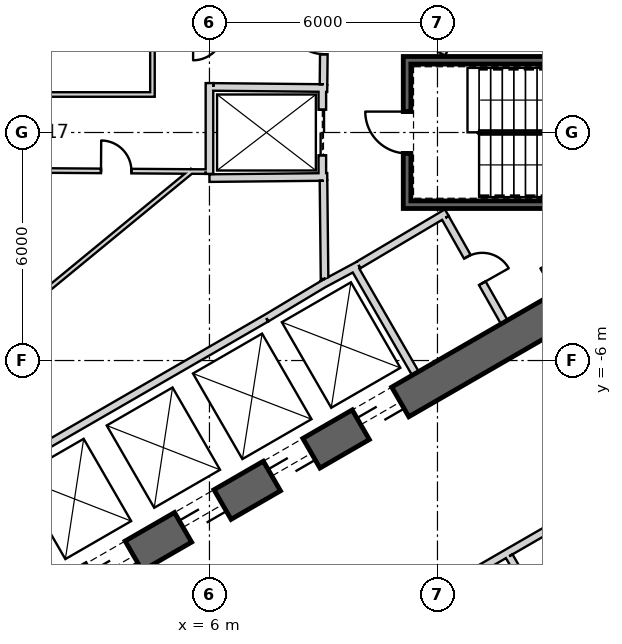
"""IFC4 building model, lengths in metres.
Left out: names, types, materials, properties, quantities, classifications, styles, units other than length and angle.
Written with IfcOpenShell. Run it as: python <this file> out.ifc"""

import sys

from ifc_helpers import new_model, si_unit, direction, frame, frame_2d, origin, place, context, subcontext, project, spatial, rectangle, extrude, element, fill, save


model = new_model("IFC4")
c1 = context("Model", 3, precision=1e-05, world=origin(), true_north=direction((0.0, 1.0)))
c2 = subcontext(c1, "Body", "Model", "MODEL_VIEW")
j1 = project(units=[si_unit("LENGTHUNIT", "METRE"), si_unit("PLANEANGLEUNIT", "RADIAN")], contexts=[c1])
p1 = place(None, origin())
s1 = spatial("IfcSite", under=j1, at=p1, CompositionType="ELEMENT")
p2 = place(p1, origin())
s2 = spatial("IfcBuilding", under=s1, at=p2, CompositionType="ELEMENT")
p3 = place(p2, frame((0.0, 0.0, 131.6)))
s3 = spatial("IfcBuildingStorey", under=s2, at=p3, CompositionType="ELEMENT", Elevation=131.6)
p4 = place(p3, frame((19.475, 2.208, 0.0), z_axis=(0.0, 0.0, 1.0), x_axis=(-0.866028369851, 0.499994862586, 0.0)))
e1 = element("IfcWall", 1, at=p4, inside=s3, PredefinedType="SHEAR", context=c2, shape_type="SweptSolid", body=[
    extrude(rectangle(XDim=31.523, YDim=0.9, at=frame_2d((15.762, 0.0))), origin(), (0.0, 0.0, 1.0), 4.1),
])
p5 = place(p4, frame((7.062, 0.0, 0.0)))
e2 = element("IfcOpeningElement", 2, at=p5, cuts=e1, PredefinedType="OPENING", context=c2, shape_type="SweptSolid", body=[
    extrude(rectangle(XDim=1.2, YDim=2.4, at=frame_2d((0.6, 1.2))), frame((0.0, 0.46, 0.0), z_axis=(0.0, -1.0, 0.0), x_axis=(1.0, 0.0, 0.0)), (0.0, 0.0, 1.0), 0.92),
])
p6 = place(p4, frame((9.762, 0.0, 0.0)))
e3 = element("IfcOpeningElement", 3, at=p6, cuts=e1, PredefinedType="OPENING", context=c2, shape_type="SweptSolid", body=[
    extrude(rectangle(XDim=1.2, YDim=2.4, at=frame_2d((0.6, 1.2))), frame((0.0, 0.46, 0.0), z_axis=(0.0, -1.0, 0.0), x_axis=(1.0, 0.0, 0.0)), (0.0, 0.0, 1.0), 0.92),
])
p7 = place(p4, frame((12.462, 0.0, 0.0)))
e4 = element("IfcOpeningElement", 4, at=p7, cuts=e1, PredefinedType="OPENING", context=c2, shape_type="SweptSolid", body=[
    extrude(rectangle(XDim=1.2, YDim=2.4, at=frame_2d((0.6, 1.2))), frame((0.0, 0.46, 0.0), z_axis=(0.0, -1.0, 0.0), x_axis=(1.0, 0.0, 0.0)), (0.0, 0.0, 1.0), 0.92),
])
p8 = place(p4, frame((15.162, 0.0, 0.0)))
e5 = element("IfcOpeningElement", 5, at=p8, cuts=e1, PredefinedType="OPENING", context=c2, shape_type="SweptSolid", body=[
    extrude(rectangle(XDim=1.2, YDim=2.4, at=frame_2d((0.6, 1.2))), frame((0.0, 0.46, 0.0), z_axis=(0.0, -1.0, 0.0), x_axis=(1.0, 0.0, 0.0)), (0.0, 0.0, 1.0), 0.92),
])
p9 = place(p4, frame((17.862, 0.0, 0.0)))
e6 = element("IfcOpeningElement", 6, at=p9, cuts=e1, PredefinedType="OPENING", context=c2, shape_type="SweptSolid", body=[
    extrude(rectangle(XDim=1.2, YDim=2.4, at=frame_2d((0.6, 1.2))), frame((0.0, 0.46, 0.0), z_axis=(0.0, -1.0, 0.0), x_axis=(1.0, 0.0, 0.0)), (0.0, 0.0, 1.0), 0.92),
])
p10 = place(p4, frame((20.562, 0.0, 0.0)))
e7 = element("IfcOpeningElement", 7, at=p10, cuts=e1, PredefinedType="OPENING", context=c2, shape_type="SweptSolid", body=[
    extrude(rectangle(XDim=1.2, YDim=2.4, at=frame_2d((0.6, 1.2))), frame((0.0, 0.46, 0.0), z_axis=(0.0, -1.0, 0.0), x_axis=(1.0, 0.0, 0.0)), (0.0, 0.0, 1.0), 0.92),
])
p11 = place(p4, frame((23.262, 0.0, 0.0)))
e8 = element("IfcOpeningElement", 8, at=p11, cuts=e1, PredefinedType="OPENING", context=c2, shape_type="SweptSolid", body=[
    extrude(rectangle(XDim=1.2, YDim=2.4, at=frame_2d((0.6, 1.2))), frame((0.0, 0.46, 0.0), z_axis=(0.0, -1.0, 0.0), x_axis=(1.0, 0.0, 0.0)), (0.0, 0.0, 1.0), 0.92),
])
p12 = place(p4, frame((3.612, 0.0, 0.0)))
e9 = element("IfcOpeningElement", 9, at=p12, cuts=e1, PredefinedType="OPENING", context=c2, shape_type="SweptSolid", body=[
    extrude(rectangle(XDim=1.2, YDim=2.4, at=frame_2d((0.6, 1.2))), frame((0.0, 0.46, 0.0), z_axis=(0.0, -1.0, 0.0), x_axis=(1.0, 0.0, 0.0)), (0.0, 0.0, 1.0), 0.92),
])
p13 = place(p4, frame((26.712, 0.0, 0.0)))
e10 = element("IfcOpeningElement", 10, at=p13, cuts=e1, PredefinedType="OPENING", context=c2, shape_type="SweptSolid", body=[
    extrude(rectangle(XDim=1.2, YDim=2.4, at=frame_2d((0.6, 1.2))), frame((0.0, 0.46, 0.0), z_axis=(0.0, -1.0, 0.0), x_axis=(1.0, 0.0, 0.0)), (0.0, 0.0, 1.0), 0.92),
])
p14 = place(p3, frame((-7.825, -17.97, 0.0), z_axis=(0.0, 0.0, 1.0), x_axis=(0.866028369851, 0.499994862586, 0.0)))
e11 = element("IfcWall", 11, at=p14, inside=s3, PredefinedType="SHEAR", context=c2, shape_type="SweptSolid", body=[
    extrude(rectangle(XDim=31.523, YDim=0.9, at=frame_2d((15.762, 0.0))), origin(), (0.0, 0.0, 1.0), 4.1),
])
p15 = place(p14, frame((7.062, 0.0, 0.0)))
e12 = element("IfcOpeningElement", 12, at=p15, cuts=e11, PredefinedType="OPENING", context=c2, shape_type="SweptSolid", body=[
    extrude(rectangle(XDim=1.2, YDim=2.4, at=frame_2d((0.6, 1.2))), frame((0.0, 0.46, 0.0), z_axis=(0.0, -1.0, 0.0), x_axis=(1.0, 0.0, 0.0)), (0.0, 0.0, 1.0), 0.92),
])
p16 = place(p14, frame((9.762, 0.0, 0.0)))
e13 = element("IfcOpeningElement", 13, at=p16, cuts=e11, PredefinedType="OPENING", context=c2, shape_type="SweptSolid", body=[
    extrude(rectangle(XDim=1.2, YDim=2.4, at=frame_2d((0.6, 1.2))), frame((0.0, 0.46, 0.0), z_axis=(0.0, -1.0, 0.0), x_axis=(1.0, 0.0, 0.0)), (0.0, 0.0, 1.0), 0.92),
])
p17 = place(p14, frame((12.462, 0.0, 0.0)))
e14 = element("IfcOpeningElement", 14, at=p17, cuts=e11, PredefinedType="OPENING", context=c2, shape_type="SweptSolid", body=[
    extrude(rectangle(XDim=1.2, YDim=2.4, at=frame_2d((0.6, 1.2))), frame((0.0, 0.46, 0.0), z_axis=(0.0, -1.0, 0.0), x_axis=(1.0, 0.0, 0.0)), (0.0, 0.0, 1.0), 0.92),
])
p18 = place(p14, frame((15.162, 0.0, 0.0)))
e15 = element("IfcOpeningElement", 15, at=p18, cuts=e11, PredefinedType="OPENING", context=c2, shape_type="SweptSolid", body=[
    extrude(rectangle(XDim=1.2, YDim=2.4, at=frame_2d((0.6, 1.2))), frame((0.0, 0.46, 0.0), z_axis=(0.0, -1.0, 0.0), x_axis=(1.0, 0.0, 0.0)), (0.0, 0.0, 1.0), 0.92),
])
p19 = place(p14, frame((17.862, 0.0, 0.0)))
e16 = element("IfcOpeningElement", 16, at=p19, cuts=e11, PredefinedType="OPENING", context=c2, shape_type="SweptSolid", body=[
    extrude(rectangle(XDim=1.2, YDim=2.4, at=frame_2d((0.6, 1.2))), frame((0.0, 0.46, 0.0), z_axis=(0.0, -1.0, 0.0), x_axis=(1.0, 0.0, 0.0)), (0.0, 0.0, 1.0), 0.92),
])
p20 = place(p14, frame((20.562, 0.0, 0.0)))
e17 = element("IfcOpeningElement", 17, at=p20, cuts=e11, PredefinedType="OPENING", context=c2, shape_type="SweptSolid", body=[
    extrude(rectangle(XDim=1.2, YDim=2.4, at=frame_2d((0.6, 1.2))), frame((0.0, 0.46, 0.0), z_axis=(0.0, -1.0, 0.0), x_axis=(1.0, 0.0, 0.0)), (0.0, 0.0, 1.0), 0.92),
])
p21 = place(p14, frame((26.712, 0.0, 0.0)))
e18 = element("IfcOpeningElement", 18, at=p21, cuts=e11, PredefinedType="OPENING", context=c2, shape_type="SweptSolid", body=[
    extrude(rectangle(XDim=1.2, YDim=2.4, at=frame_2d((0.6, 1.2))), frame((0.0, 0.46, 0.0), z_axis=(0.0, -1.0, 0.0), x_axis=(1.0, 0.0, 0.0)), (0.0, 0.0, 1.0), 0.92),
])
p22 = place(p14, frame((3.612, 0.0, 0.0)))
e19 = element("IfcOpeningElement", 19, at=p22, cuts=e11, PredefinedType="OPENING", context=c2, shape_type="SweptSolid", body=[
    extrude(rectangle(XDim=1.2, YDim=2.4, at=frame_2d((0.6, 1.2))), frame((0.0, 0.46, 0.0), z_axis=(0.0, -1.0, 0.0), x_axis=(1.0, 0.0, 0.0)), (0.0, 0.0, 1.0), 0.92),
])
p23 = place(p3, frame((12.11, 2.073, 0.0), z_axis=(0.0, 0.0, 1.0), x_axis=(0.49196600604, 0.870614408852, 0.0)))
e20 = element("IfcWall", 20, at=p23, inside=s3, PredefinedType="PLUMBINGWALL", context=c2, shape_type="SweptSolid", body=[
    extrude(rectangle(XDim=3.35, YDim=0.2, at=frame_2d((1.675, 0.0))), origin(), (0.0, 0.0, 1.0), 3.8),
])
p24 = place(p3, frame((0.483, -8.936, 0.0), z_axis=(0.0, 0.0, 1.0), x_axis=(0.866030989016, 0.499990325971, 0.0)))
e21 = element("IfcWall", 21, at=p24, inside=s3, PredefinedType="PLUMBINGWALL", context=c2, shape_type="SweptSolid", body=[
    extrude(rectangle(XDim=8.1, YDim=0.2, at=frame_2d((4.05, 0.0))), origin(), (0.0, 0.0, 1.0), 3.8),
])
p25 = place(p3, frame((9.795, -3.525, 0.0), z_axis=(0.0, 0.0, 1.0), x_axis=(0.499984717929, -0.866034226713, 0.0)))
e22 = element("IfcWall", 22, at=p25, inside=s3, PredefinedType="PLUMBINGWALL", context=c2, shape_type="SweptSolid", body=[
    extrude(rectangle(XDim=3.25, YDim=0.2, at=frame_2d((1.625, 0.0))), origin(), (0.0, 0.0, 1.0), 3.8),
])
p26 = place(p3, frame((8.974, -3.999, 0.0), z_axis=(0.0, 0.0, 1.0), x_axis=(0.880907015104, 0.473289373154, 0.0)))
e23 = element("IfcWall", 23, at=p26, inside=s3, PredefinedType="PLUMBINGWALL", context=c2, shape_type="SweptSolid", body=[
    extrude(rectangle(XDim=1.078, YDim=0.2, at=frame_2d((0.539, 0.0))), origin(), (0.0, 0.0, 1.0), 3.8),
])
p27 = place(p3, frame((7.497, -4.886, 0.0), z_axis=(0.0, 0.0, 1.0), x_axis=(0.857516281273, 0.51445682749, 0.0)))
e24 = element("IfcWall", 24, at=p27, inside=s3, PredefinedType="PLUMBINGWALL", context=c2, shape_type="SweptSolid", body=[
    extrude(rectangle(XDim=1.845, YDim=0.2, at=frame_2d((0.922, 0.0))), origin(), (0.0, 0.0, 1.0), 3.8),
])
p28 = place(p3, frame((19.2, 1.9, -0.3), z_axis=(0.0, 0.0, 1.0), x_axis=(-1.0, 0.0, 0.0)))
e25 = element("IfcWall", 25, at=p28, inside=s3, PredefinedType="SHEAR", context=c2, shape_type="SweptSolid", body=[
    extrude(rectangle(XDim=8.1, YDim=0.2, at=frame_2d((4.05, 0.0))), origin(), (0.0, 0.0, 1.0), 4.1),
])
p29 = place(p3, frame((11.1, -1.9, -0.3), z_axis=(0.0, 0.0, 1.0), x_axis=(1.0, 0.0, 0.0)))
e26 = element("IfcWall", 26, at=p29, inside=s3, PredefinedType="SHEAR", context=c2, shape_type="SweptSolid", body=[
    extrude(rectangle(XDim=7.9, YDim=0.2, at=frame_2d((3.95, 0.0))), origin(), (0.0, 0.0, 1.0), 4.1),
])
p30 = place(p3, frame((11.2, -1.8, -0.3), z_axis=(0.0, 0.0, 1.0), x_axis=(0.0, 1.0, 0.0)))
e27 = element("IfcWall", 27, at=p30, inside=s3, PredefinedType="SHEAR", context=c2, shape_type="SweptSolid", body=[
    extrude(rectangle(XDim=3.6, YDim=0.2, at=frame_2d((1.8, 0.0))), origin(), (0.0, 0.0, 1.0), 4.1),
])
p31 = place(p30, frame((1.25, 0.0, 0.3)))
e28 = element("IfcOpeningElement", 28, at=p31, cuts=e27, PredefinedType="OPENING", context=c2, shape_type="SweptSolid", body=[
    extrude(rectangle(XDim=1.1, YDim=2.1, at=frame_2d((0.55, 1.05))), frame((0.0, 0.11, 0.0), z_axis=(0.0, -1.0, 0.0), x_axis=(1.0, 0.0, 0.0)), (0.0, 0.0, 1.0), 0.22),
])
p32 = place(p3, frame((8.97, 1.2, 0.0), z_axis=(0.0, 0.0, 1.0), x_axis=(0.0, -1.0, 0.0)))
e29 = element("IfcWall", 29, at=p32, inside=s3, PredefinedType="PLUMBINGWALL", context=c2, shape_type="SweptSolid", body=[
    extrude(rectangle(XDim=2.4, YDim=0.2, at=frame_2d((1.2, 0.0))), origin(), (0.0, 0.0, 1.0), 3.8),
])
p33 = place(p32, frame((0.6, 0.0, 0.0)))
e30 = element("IfcOpeningElement", 30, at=p33, cuts=e29, PredefinedType="OPENING", context=c2, shape_type="SweptSolid", body=[
    extrude(rectangle(XDim=1.2, YDim=2.4, at=frame_2d((0.6, 1.2))), frame((0.0, 0.11, 0.0), z_axis=(0.0, -1.0, 0.0), x_axis=(1.0, 0.0, 0.0)), (0.0, 0.0, 1.0), 0.22),
])
p34 = place(p3, frame((9.1, -1.169, 0.0), z_axis=(0.0, 0.0, 1.0), x_axis=(-0.999949988, -0.010001074852, 0.0)))
e31 = element("IfcWall", 31, at=p34, inside=s3, PredefinedType="PLUMBINGWALL", context=c2, shape_type="SweptSolid", body=[
    extrude(rectangle(XDim=3.1, YDim=0.2, at=frame_2d((1.55, 0.0))), origin(), (0.0, 0.0, 1.0), 3.8),
])
p35 = place(p3, frame((6.0, -1.09, 0.0), z_axis=(0.0, 0.0, 1.0), x_axis=(0.0, 1.0, 0.0)))
e32 = element("IfcWall", 32, at=p35, inside=s3, PredefinedType="PLUMBINGWALL", context=c2, shape_type="SweptSolid", body=[
    extrude(rectangle(XDim=2.39, YDim=0.2, at=frame_2d((1.195, 0.0))), origin(), (0.0, 0.0, 1.0), 3.8),
])
p36 = place(p3, frame((9.1, 1.169, 0.0), z_axis=(0.0, 0.0, 1.0), x_axis=(-0.99994990606, 0.010009264196, 0.0)))
e33 = element("IfcWall", 33, at=p36, inside=s3, PredefinedType="PLUMBINGWALL", context=c2, shape_type="SweptSolid", body=[
    extrude(rectangle(XDim=3.0, YDim=0.2, at=frame_2d((1.5, 0.0))), origin(), (0.0, 0.0, 1.0), 3.8),
])
p37 = place(p3, frame((12.245, -2.109, 0.0), z_axis=(0.0, 0.0, 1.0), x_axis=(-0.860414880418, -0.509594185166, 0.0)))
e34 = element("IfcWall", 34, at=p37, inside=s3, PredefinedType="PARTITIONING", context=c2, shape_type="SweptSolid", body=[
    extrude(rectangle(XDim=2.7, YDim=0.2, at=frame_2d((1.35, 0.0))), origin(), (0.0, 0.0, 1.0), 3.8),
])
p38 = place(p3, frame((13.758, -4.99, 0.0), z_axis=(0.0, 0.0, 1.0), x_axis=(-0.491993409184, 0.87059892334, 0.0)))
e35 = element("IfcWall", 35, at=p38, inside=s3, PredefinedType="PARTITIONING", context=c2, shape_type="SweptSolid", body=[
    extrude(rectangle(XDim=3.15, YDim=0.2, at=frame_2d((1.575, 0.0))), origin(), (0.0, 0.0, 1.0), 3.8),
])
p39 = place(p38, frame((1.175, 0.0, 0.0)))
e36 = element("IfcOpeningElement", 36, at=p39, cuts=e35, PredefinedType="OPENING", context=c2, shape_type="SweptSolid", body=[
    extrude(rectangle(XDim=0.8, YDim=2.1, at=frame_2d((0.4, 1.05))), frame((0.0, 0.11, 0.0), z_axis=(0.0, -1.0, 0.0), x_axis=(1.0, 0.0, 0.0)), (0.0, 0.0, 1.0), 0.22),
])
p40 = place(p3, frame((9.029, -3.851, 0.0), z_axis=(0.0, 0.0, 1.0), x_axis=(-0.010784614026, 0.999941844359, 0.0)))
e37 = element("IfcWall", 37, at=p40, inside=s3, PredefinedType="PARTITIONING", context=c2, shape_type="SweptSolid", body=[
    extrude(rectangle(XDim=2.581, YDim=0.2, at=frame_2d((1.291, 0.0))), origin(), (0.0, 0.0, 1.0), 3.8),
])
p41 = place(p3, frame((9.001, 1.27, 0.0), z_axis=(0.0, 0.0, 1.0), x_axis=(0.010783593937, 0.99994185536, 0.0)))
e38 = element("IfcWall", 38, at=p41, inside=s3, PredefinedType="PARTITIONING", context=c2, shape_type="SweptSolid", body=[
    extrude(rectangle(XDim=2.581, YDim=0.2, at=frame_2d((1.291, 0.0))), origin(), (0.0, 0.0, 1.0), 3.8),
])
p42 = place(p41, frame((0.791, 0.0, 0.0)))
e39 = element("IfcOpeningElement", 39, at=p42, cuts=e38, PredefinedType="OPENING", context=c2, shape_type="SweptSolid", body=[
    extrude(rectangle(XDim=1.0, YDim=2.1, at=frame_2d((0.5, 1.05))), frame((0.0, 0.11, 0.0), z_axis=(0.0, -1.0, 0.0), x_axis=(1.0, 0.0, 0.0)), (0.0, 0.0, 1.0), 0.22),
])
p43 = place(p3, frame((5.548, -1.0, 0.0), z_axis=(0.0, 0.0, 1.0), x_axis=(-0.772345431507, -0.635202750648, 0.0)))
e40 = element("IfcWall", 40, at=p43, inside=s3, PredefinedType="PARTITIONING", context=c2, shape_type="SweptSolid", body=[
    extrude(rectangle(XDim=7.415, YDim=0.12, at=frame_2d((3.707, 0.0))), origin(), (0.0, 0.0, 1.0), 3.8),
])
p44 = place(p3, frame((5.9, -1.029, 0.0), z_axis=(0.0, 0.0, 1.0), x_axis=(-0.999977012451, 0.006780454946, 0.0)))
e41 = element("IfcWall", 41, at=p44, inside=s3, PredefinedType="PARTITIONING", context=c2, shape_type="SweptSolid", body=[
    extrude(rectangle(XDim=4.357, YDim=0.12, at=frame_2d((2.178, 0.0))), origin(), (0.0, 0.0, 1.0), 3.8),
])
p45 = place(p44, frame((1.954, 0.0, 0.0)))
e42 = element("IfcOpeningElement", 42, at=p45, cuts=e41, PredefinedType="OPENING", context=c2, shape_type="SweptSolid", body=[
    extrude(rectangle(XDim=0.8, YDim=2.1, at=frame_2d((0.4, 1.05))), frame((0.0, 0.07, 0.0), z_axis=(0.0, -1.0, 0.0), x_axis=(1.0, 0.0, 0.0)), (0.0, 0.0, 1.0), 0.14),
])
p46 = place(p3, frame((4.5, 0.94, 0.0), z_axis=(0.0, 0.0, 1.0), x_axis=(0.0, 1.0, 0.0)))
e43 = element("IfcWall", 43, at=p46, inside=s3, PredefinedType="PARTITIONING", context=c2, shape_type="SweptSolid", body=[
    extrude(rectangle(XDim=1.7, YDim=0.12, at=frame_2d((0.85, 0.0))), origin(), (0.0, 0.0, 1.0), 3.8),
])
p47 = place(p3, frame((1.542, 1.0, 0.0), z_axis=(0.0, 0.0, 1.0), x_axis=(1.0, 0.0, 0.0)))
e44 = element("IfcWall", 44, at=p47, inside=s3, PredefinedType="PARTITIONING", context=c2, shape_type="SweptSolid", body=[
    extrude(rectangle(XDim=2.898, YDim=0.12, at=frame_2d((1.449, 0.0))), origin(), (0.0, 0.0, 1.0), 3.8),
])
p48 = place(p3, frame((-0.523, -19.354, 0.0), z_axis=(0.0, 0.0, 1.0), x_axis=(0.866024925705, 0.500000828058, 0.0)))
e45 = element("IfcWall", 45, at=p48, inside=s3, PredefinedType="PARTITIONING", context=c2, shape_type="SweptSolid", body=[
    extrude(rectangle(XDim=26.647, YDim=0.2, at=frame_2d((13.323, 0.0))), origin(), (0.0, 0.0, 1.0), 2.98),
])
p49 = place(p48, frame((21.145, 0.0, 0.0)))
e46 = element("IfcOpeningElement", 46, at=p49, cuts=e45, PredefinedType="OPENING", context=c2, shape_type="SweptSolid", body=[
    extrude(rectangle(XDim=1.0, YDim=2.1, at=frame_2d((0.5, 1.05))), frame((0.0, 0.11, 0.0), z_axis=(0.0, -1.0, 0.0), x_axis=(1.0, 0.0, 0.0)), (0.0, 0.0, 1.0), 0.22),
])
p50 = place(p48, frame((9.691, 0.0, 0.0)))
e47 = element("IfcOpeningElement", 47, at=p50, cuts=e45, PredefinedType="OPENING", context=c2, shape_type="SweptSolid", body=[
    extrude(rectangle(XDim=1.0, YDim=2.1, at=frame_2d((0.5, 1.05))), frame((0.0, 0.11, 0.0), z_axis=(0.0, -1.0, 0.0), x_axis=(1.0, 0.0, 0.0)), (0.0, 0.0, 1.0), 0.22),
])
p51 = place(p48, frame((1.369, 0.0, 0.0)))
e48 = element("IfcOpeningElement", 48, at=p51, cuts=e45, PredefinedType="OPENING", context=c2, shape_type="SweptSolid", body=[
    extrude(rectangle(XDim=1.0, YDim=2.1, at=frame_2d((0.5, 1.05))), frame((0.0, 0.11, 0.0), z_axis=(0.0, -1.0, 0.0), x_axis=(1.0, 0.0, 0.0)), (0.0, 0.0, 1.0), 0.22),
])
p52 = place(p3, frame((13.888, -11.15, 0.0), z_axis=(0.0, 0.0, 1.0), x_axis=(0.499931641511, -0.86606486698, 0.0)))
e49 = element("IfcWall", 49, at=p52, inside=s3, PredefinedType="PARTITIONING", context=c2, shape_type="SweptSolid", body=[
    extrude(rectangle(XDim=9.901, YDim=0.2, at=frame_2d((4.95, 0.0))), origin(), (0.0, 0.0, 1.0), 3.08),
])
p53 = place(p31, origin())
e50 = element("IfcDoor", 50, at=p53, inside=s3, OperationType="SINGLE_SWING_LEFT", PredefinedType="USERDEFINED", context=c2, shape_type="SweptSolid", body=[
    extrude(rectangle(XDim=1.1, YDim=2.1, at=frame_2d((0.55, 1.05))), frame((0.0, 0.025, 0.0), z_axis=(0.0, -1.0, 0.0), x_axis=(1.0, 0.0, 0.0)), (0.0, 0.0, 1.0), 0.05),
])
fill(e28, e50)
p54 = place(p42, origin())
e51 = element("IfcDoor", 51, at=p54, inside=s3, OperationType="SINGLE_SWING_LEFT", PredefinedType="USERDEFINED", context=c2, shape_type="SweptSolid", body=[
    extrude(rectangle(XDim=1.0, YDim=2.1, at=frame_2d((0.5, 1.05))), frame((0.0, 0.025, 0.0), z_axis=(0.0, -1.0, 0.0), x_axis=(1.0, 0.0, 0.0)), (0.0, 0.0, 1.0), 0.05),
])
fill(e39, e51)
p55 = place(p33, origin())
e52 = element("IfcDoor", 52, at=p55, inside=s3, OperationType="SLIDING_TO_LEFT", PredefinedType="USERDEFINED", context=c2, shape_type="SweptSolid", body=[
    extrude(rectangle(XDim=1.2, YDim=2.4, at=frame_2d((0.6, 1.2))), frame((0.0, 0.025, 0.0), z_axis=(0.0, -1.0, 0.0), x_axis=(1.0, 0.0, 0.0)), (0.0, 0.0, 1.0), 0.05),
])
fill(e30, e52)
p56 = place(p45, origin())
e53 = element("IfcDoor", 53, at=p56, inside=s3, OperationType="SINGLE_SWING_RIGHT", PredefinedType="USERDEFINED", context=c2, shape_type="SweptSolid", body=[
    extrude(rectangle(XDim=0.8, YDim=2.1, at=frame_2d((0.4, 1.05))), frame((0.0, 0.025, 0.0), z_axis=(0.0, -1.0, 0.0), x_axis=(1.0, 0.0, 0.0)), (0.0, 0.0, 1.0), 0.05),
])
fill(e42, e53)
p57 = place(p39, origin())
e54 = element("IfcDoor", 54, at=p57, inside=s3, OperationType="SINGLE_SWING_LEFT", PredefinedType="USERDEFINED", context=c2, shape_type="SweptSolid", body=[
    extrude(rectangle(XDim=0.8, YDim=2.1, at=frame_2d((0.4, 1.05))), frame((0.0, 0.025, 0.0), z_axis=(0.0, -1.0, 0.0), x_axis=(1.0, 0.0, 0.0)), (0.0, 0.0, 1.0), 0.05),
])
fill(e36, e54)
p58 = place(p17, origin())
e55 = element("IfcDoor", 55, at=p58, inside=s3, OperationType="SLIDING_TO_LEFT", PredefinedType="USERDEFINED", context=c2, shape_type="SweptSolid", body=[
    extrude(rectangle(XDim=1.2, YDim=2.4, at=frame_2d((0.6, 1.2))), frame((0.0, 0.025, 0.0), z_axis=(0.0, -1.0, 0.0), x_axis=(1.0, 0.0, 0.0)), (0.0, 0.0, 1.0), 0.05),
])
fill(e14, e55)
p59 = place(p18, origin())
e56 = element("IfcDoor", 56, at=p59, inside=s3, OperationType="SLIDING_TO_LEFT", PredefinedType="USERDEFINED", context=c2, shape_type="SweptSolid", body=[
    extrude(rectangle(XDim=1.2, YDim=2.4, at=frame_2d((0.6, 1.2))), frame((0.0, 0.025, 0.0), z_axis=(0.0, -1.0, 0.0), x_axis=(1.0, 0.0, 0.0)), (0.0, 0.0, 1.0), 0.05),
])
fill(e15, e56)
p60 = place(p19, origin())
e57 = element("IfcDoor", 57, at=p60, inside=s3, OperationType="SLIDING_TO_LEFT", PredefinedType="USERDEFINED", context=c2, shape_type="SweptSolid", body=[
    extrude(rectangle(XDim=1.2, YDim=2.4, at=frame_2d((0.6, 1.2))), frame((0.0, 0.025, 0.0), z_axis=(0.0, -1.0, 0.0), x_axis=(1.0, 0.0, 0.0)), (0.0, 0.0, 1.0), 0.05),
])
fill(e16, e57)
p61 = place(p20, origin())
e58 = element("IfcDoor", 58, at=p61, inside=s3, OperationType="SLIDING_TO_LEFT", PredefinedType="USERDEFINED", context=c2, shape_type="SweptSolid", body=[
    extrude(rectangle(XDim=1.2, YDim=2.4, at=frame_2d((0.6, 1.2))), frame((0.0, 0.025, 0.0), z_axis=(0.0, -1.0, 0.0), x_axis=(1.0, 0.0, 0.0)), (0.0, 0.0, 1.0), 0.05),
])
fill(e17, e58)
save(model, sys.argv[1])
